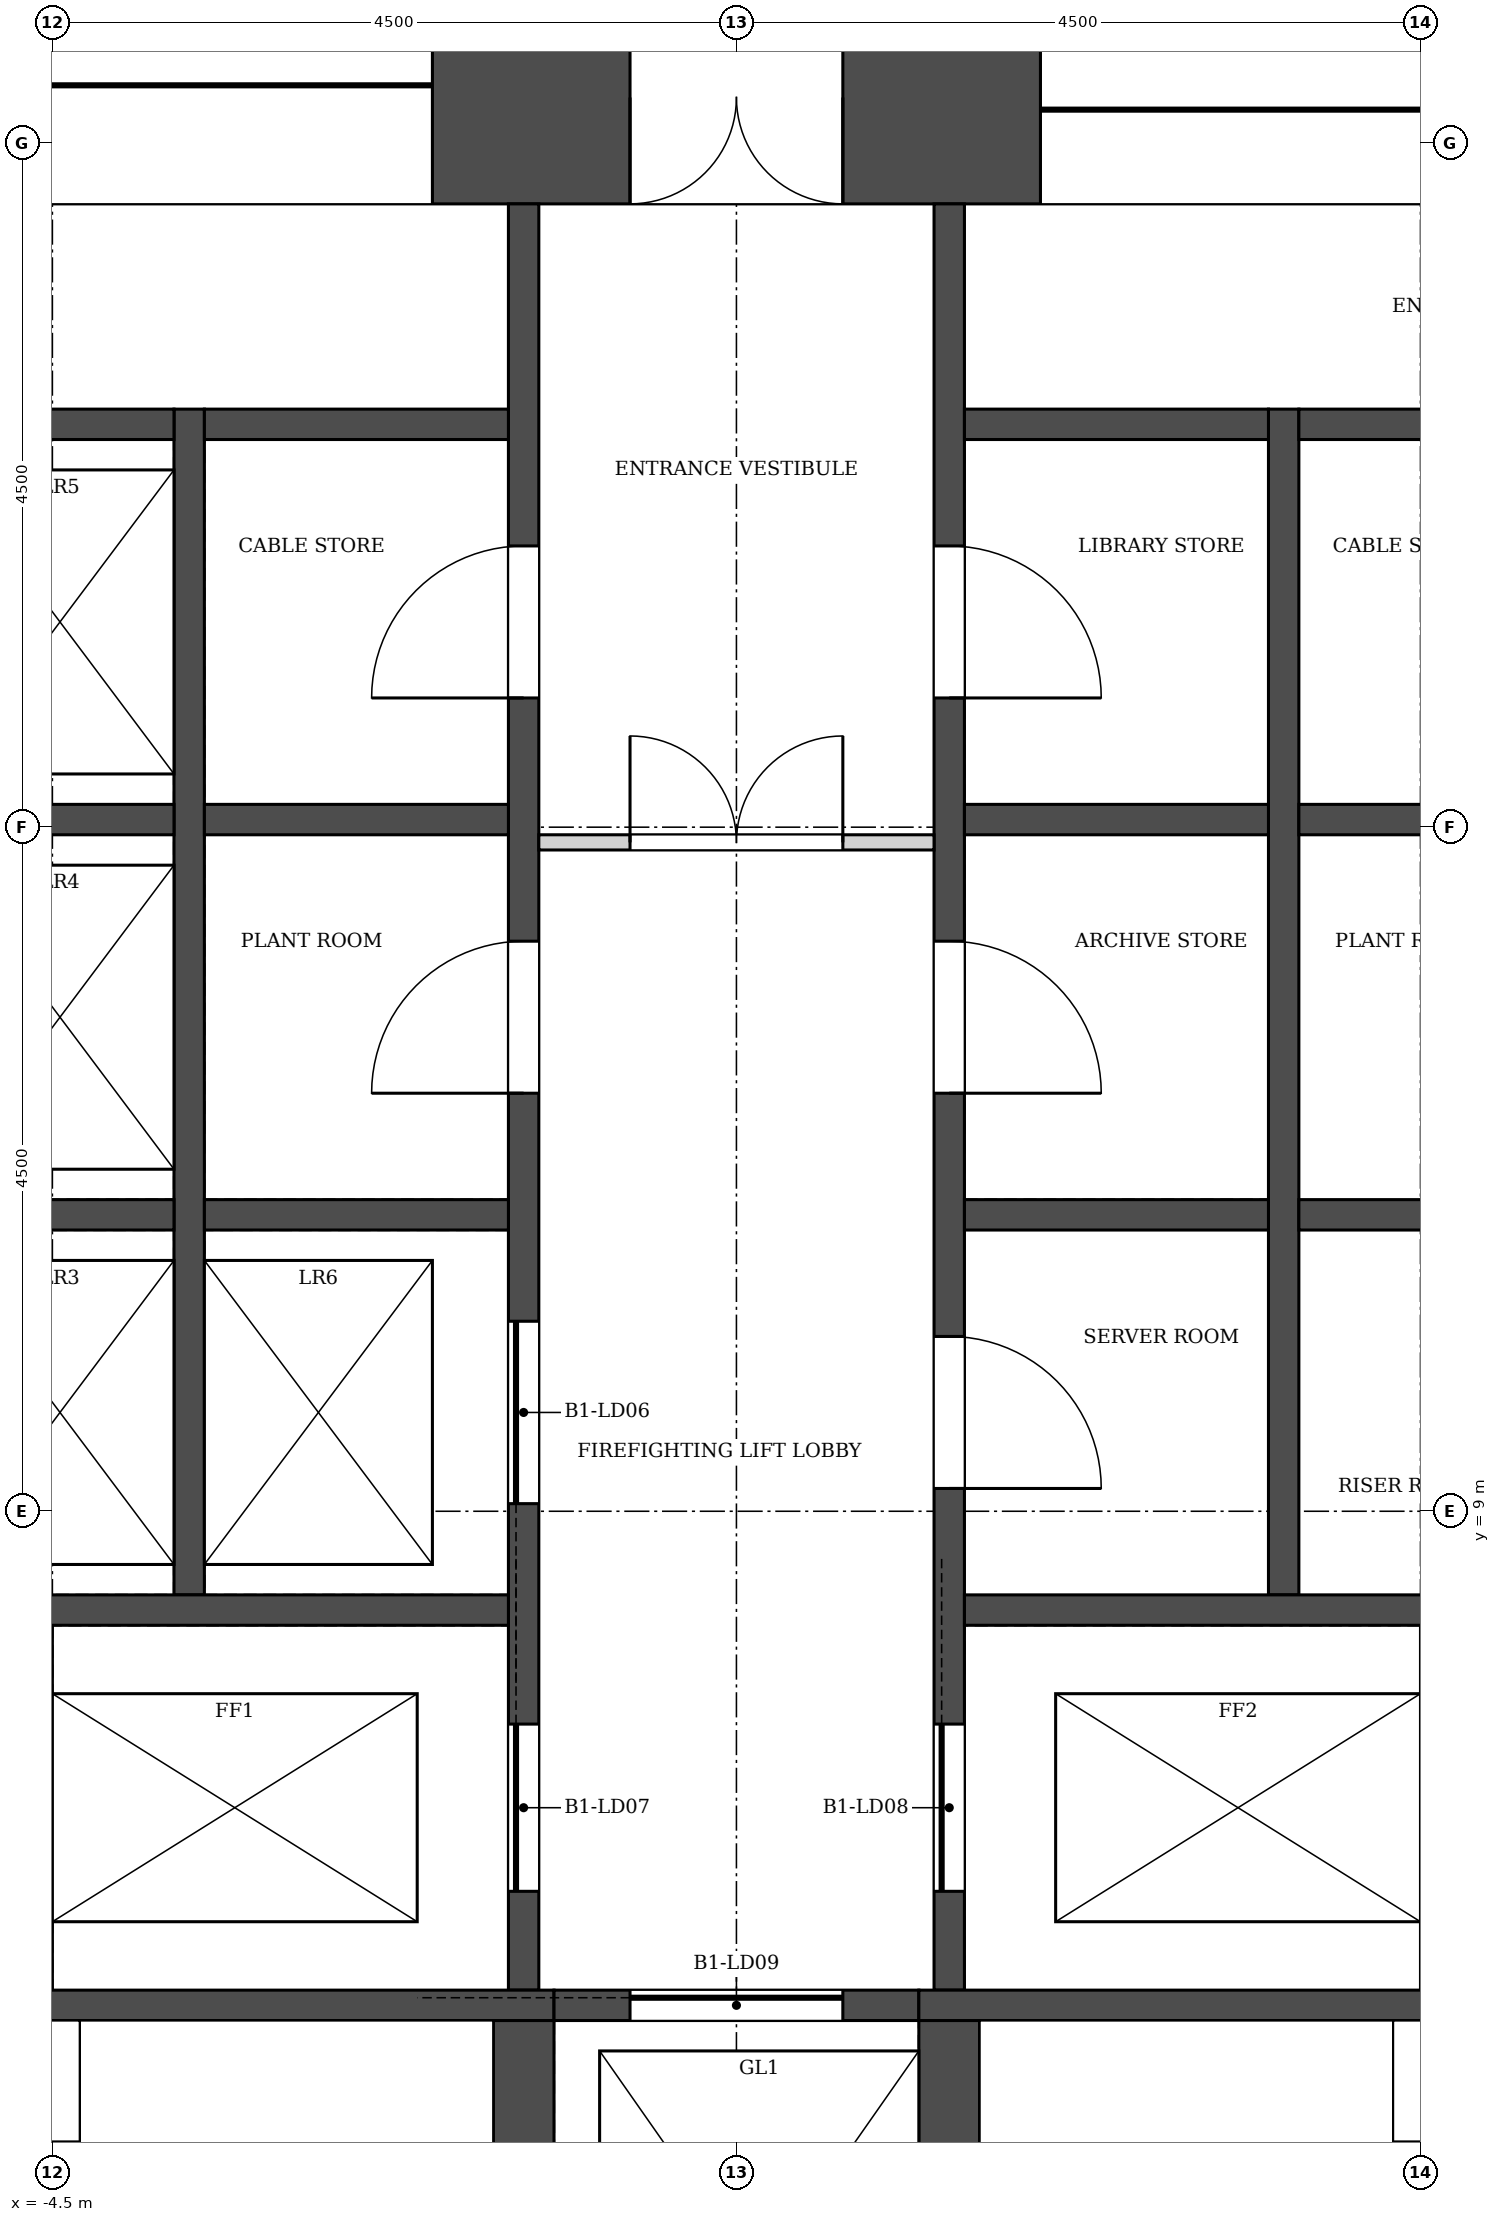
"""IFC4 building model, lengths in metres.
Left out: names, types, materials, properties, quantities, classifications, styles, units other than length and angle.
Written with IfcOpenShell. Run it as: python <this file> out.ifc"""

import sys

from ifc_helpers import new_model, si_unit, direction, frame, frame_2d, origin, place, context, subcontext, project, spatial, rectangle, extrude, element, fill, save


model = new_model("IFC4")
c1 = context("Model", 3, precision=1e-05, world=origin(), true_north=direction((0.0, 1.0)))
c2 = subcontext(c1, "Body", "Model", "MODEL_VIEW")
j1 = project(units=[si_unit("LENGTHUNIT", "METRE"), si_unit("PLANEANGLEUNIT", "RADIAN")], contexts=[c1])
p1 = place(None, origin())
s1 = spatial("IfcSite", under=j1, at=p1, CompositionType="ELEMENT")
p2 = place(p1, origin())
s2 = spatial("IfcBuilding", under=s1, at=p2, CompositionType="ELEMENT")
p3 = place(p2, frame((0.0, 0.0, -8.0)))
s3 = spatial("IfcBuildingStorey", under=s2, at=p3, CompositionType="ELEMENT", Elevation=-8.0)
p4 = place(p3, frame((9.412, 18.3, 0.0), z_axis=(0.0, 0.0, 1.0), x_axis=(-1.0, 0.0, 0.0)))
e1 = element("IfcWall", 1, at=p4, inside=s3, PredefinedType="SHEAR", context=c2, shape_type="SweptSolid", body=[
    extrude(rectangle(XDim=18.823, YDim=1.4, at=frame_2d((9.412, 0.0))), origin(), (0.0, 0.0, 1.0), 8.0),
])
p5 = place(p4, frame((8.711, 0.0, 0.0)))
e2 = element("IfcOpeningElement", 2, at=p5, cuts=e1, PredefinedType="OPENING", context=c2, shape_type="SweptSolid", body=[
    extrude(rectangle(XDim=1.4, YDim=2.1, at=frame_2d((0.7, 1.05))), frame((0.0, 0.71, 0.0), z_axis=(0.0, -1.0, 0.0), x_axis=(1.0, 0.0, 0.0)), (0.0, 0.0, 1.0), 1.42),
])
p6 = place(p4, frame((11.412, 0.0, 0.0)))
e3 = element("IfcOpeningElement", 3, at=p6, cuts=e1, PredefinedType="OPENING", context=c2, shape_type="SweptSolid", body=[
    extrude(rectangle(XDim=6.0, YDim=2.4, at=frame_2d((3.0, 1.2))), frame((0.0, 0.71, 0.0), z_axis=(0.0, -1.0, 0.0), x_axis=(1.0, 0.0, 0.0)), (0.0, 0.0, 1.0), 1.42),
])
p7 = place(p4, frame((1.412, 0.0, 0.0)))
e4 = element("IfcOpeningElement", 4, at=p7, cuts=e1, PredefinedType="OPENING", context=c2, shape_type="SweptSolid", body=[
    extrude(rectangle(XDim=6.0, YDim=2.4, at=frame_2d((3.0, 1.2))), frame((0.0, 0.71, 0.0), z_axis=(0.0, -1.0, 0.0), x_axis=(1.0, 0.0, 0.0)), (0.0, 0.0, 1.0), 1.42),
])
for number, where, z_axis, x_axis in (
    (5, (-3.6, 8.45, -0.35), (0.0, 0.0, 1.0), (0.0, 1.0, 0.0)),
    (6, (3.6, 8.45, -0.35), (0.0, 0.0, 1.0), (0.0, 1.0, 0.0)),
):
    element("IfcWall", number, at=place(p3, frame(where, z_axis=z_axis, x_axis=x_axis)), inside=s3, PredefinedType="SOLIDWALL", context=c2, shape_type="SweptSolid", body=[
        extrude(rectangle(XDim=7.8, YDim=0.2, at=frame_2d((3.9, 0.0))), origin(), (0.0, 0.0, 1.0), 7.95),
    ])
p8 = place(p3, frame((-1.4, 5.85, -0.35), z_axis=(0.0, 0.0, 1.0), x_axis=(0.0, 1.0, 0.0)))
e7 = element("IfcWall", 7, at=p8, inside=s3, PredefinedType="SOLIDWALL", context=c2, shape_type="SweptSolid", body=[
    extrude(rectangle(XDim=11.75, YDim=0.2, at=frame_2d((5.875, 0.0))), origin(), (0.0, 0.0, 1.0), 7.95),
])
p9 = place(p8, frame((3.2, 0.0, 0.35)))
e8 = element("IfcOpeningElement", 8, at=p9, cuts=e7, PredefinedType="OPENING", context=c2, shape_type="SweptSolid", body=[
    extrude(rectangle(XDim=1.2, YDim=2.1, at=frame_2d((0.6, 1.05))), frame((0.0, 0.11, 0.0), z_axis=(0.0, -1.0, 0.0), x_axis=(1.0, 0.0, 0.0)), (0.0, 0.0, 1.0), 0.22),
])
p10 = place(p8, frame((0.65, 0.0, 0.35)))
e9 = element("IfcOpeningElement", 9, at=p10, cuts=e7, PredefinedType="OPENING", context=c2, shape_type="SweptSolid", body=[
    extrude(rectangle(XDim=1.1, YDim=2.1, at=frame_2d((0.55, 1.05))), frame((0.0, 0.11, 0.0), z_axis=(0.0, -1.0, 0.0), x_axis=(1.0, 0.0, 0.0)), (0.0, 0.0, 1.0), 0.22),
])
p11 = place(p8, frame((5.9, 0.0, 0.35)))
e10 = element("IfcOpeningElement", 10, at=p11, cuts=e7, PredefinedType="OPENING", context=c2, shape_type="SweptSolid", body=[
    extrude(rectangle(XDim=1.0, YDim=2.1, at=frame_2d((0.5, 1.05))), frame((0.0, 0.11, 0.0), z_axis=(0.0, -1.0, 0.0), x_axis=(1.0, 0.0, 0.0)), (0.0, 0.0, 1.0), 0.22),
])
p12 = place(p8, frame((8.5, 0.0, 0.35)))
e11 = element("IfcOpeningElement", 11, at=p12, cuts=e7, PredefinedType="OPENING", context=c2, shape_type="SweptSolid", body=[
    extrude(rectangle(XDim=1.0, YDim=2.1, at=frame_2d((0.5, 1.05))), frame((0.0, 0.11, 0.0), z_axis=(0.0, -1.0, 0.0), x_axis=(1.0, 0.0, 0.0)), (0.0, 0.0, 1.0), 0.22),
])
p13 = place(p3, frame((1.4, 5.85, -0.35), z_axis=(0.0, 0.0, 1.0), x_axis=(0.0, 1.0, 0.0)))
e12 = element("IfcWall", 12, at=p13, inside=s3, PredefinedType="SOLIDWALL", context=c2, shape_type="SweptSolid", body=[
    extrude(rectangle(XDim=11.75, YDim=0.2, at=frame_2d((5.875, 0.0))), origin(), (0.0, 0.0, 1.0), 7.95),
])
p14 = place(p13, frame((0.65, 0.0, 0.35)))
e13 = element("IfcOpeningElement", 13, at=p14, cuts=e12, PredefinedType="OPENING", context=c2, shape_type="SweptSolid", body=[
    extrude(rectangle(XDim=1.1, YDim=2.1, at=frame_2d((0.55, 1.05))), frame((0.0, 0.11, 0.0), z_axis=(0.0, -1.0, 0.0), x_axis=(1.0, 0.0, 0.0)), (0.0, 0.0, 1.0), 0.22),
])
p15 = place(p13, frame((3.3, 0.0, 0.35)))
e14 = element("IfcOpeningElement", 14, at=p15, cuts=e12, PredefinedType="OPENING", context=c2, shape_type="SweptSolid", body=[
    extrude(rectangle(XDim=1.0, YDim=2.1, at=frame_2d((0.5, 1.05))), frame((0.0, 0.11, 0.0), z_axis=(0.0, -1.0, 0.0), x_axis=(1.0, 0.0, 0.0)), (0.0, 0.0, 1.0), 0.22),
])
p16 = place(p13, frame((5.9, 0.0, 0.35)))
e15 = element("IfcOpeningElement", 15, at=p16, cuts=e12, PredefinedType="OPENING", context=c2, shape_type="SweptSolid", body=[
    extrude(rectangle(XDim=1.0, YDim=2.1, at=frame_2d((0.5, 1.05))), frame((0.0, 0.11, 0.0), z_axis=(0.0, -1.0, 0.0), x_axis=(1.0, 0.0, 0.0)), (0.0, 0.0, 1.0), 0.22),
])
p17 = place(p13, frame((8.5, 0.0, 0.35)))
e16 = element("IfcOpeningElement", 16, at=p17, cuts=e12, PredefinedType="OPENING", context=c2, shape_type="SweptSolid", body=[
    extrude(rectangle(XDim=1.0, YDim=2.1, at=frame_2d((0.5, 1.05))), frame((0.0, 0.11, 0.0), z_axis=(0.0, -1.0, 0.0), x_axis=(1.0, 0.0, 0.0)), (0.0, 0.0, 1.0), 0.22),
])
for number, where, z_axis, x_axis in (
    (17, (-5.7, 8.35, -0.35), (0.0, 0.0, 1.0), (1.0, 0.0, 0.0)),
    (18, (1.5, 8.35, -0.35), (0.0, 0.0, 1.0), (1.0, 0.0, 0.0)),
):
    element("IfcWall", number, at=place(p3, frame(where, z_axis=z_axis, x_axis=x_axis)), inside=s3, PredefinedType="SOLIDWALL", context=c2, shape_type="SweptSolid", body=[
        extrude(rectangle(XDim=4.2, YDim=0.2, at=frame_2d((2.1, 0.0))), origin(), (0.0, 0.0, 1.0), 7.95),
    ])
p18 = place(p3, frame((-12.6, 5.75, -0.35), z_axis=(0.0, 0.0, 1.0), x_axis=(1.0, 0.0, 0.0)))
e19 = element("IfcWall", 19, at=p18, inside=s3, PredefinedType="SOLIDWALL", context=c2, shape_type="SweptSolid", body=[
    extrude(rectangle(XDim=11.4, YDim=0.2, at=frame_2d((5.7, 0.0))), origin(), (0.0, 0.0, 1.0), 7.95),
])
p19 = place(p3, frame((-1.2, 5.75, -0.35), z_axis=(0.0, 0.0, 1.0), x_axis=(1.0, 0.0, 0.0)))
e20 = element("IfcWall", 20, at=p19, inside=s3, PredefinedType="SOLIDWALL", context=c2, shape_type="SweptSolid", body=[
    extrude(rectangle(XDim=2.4, YDim=0.2, at=frame_2d((1.2, 0.0))), origin(), (0.0, 0.0, 1.0), 7.95),
])
p20 = place(p19, frame((0.5, 0.0, 0.35)))
e21 = element("IfcOpeningElement", 21, at=p20, cuts=e20, PredefinedType="OPENING", context=c2, shape_type="SweptSolid", body=[
    extrude(rectangle(XDim=1.4, YDim=2.1, at=frame_2d((0.7, 1.05))), frame((0.0, 0.11, 0.0), z_axis=(0.0, -1.0, 0.0), x_axis=(1.0, 0.0, 0.0)), (0.0, 0.0, 1.0), 0.22),
])
p21 = place(p3, frame((1.2, 5.75, -0.35), z_axis=(0.0, 0.0, 1.0), x_axis=(1.0, 0.0, 0.0)))
e22 = element("IfcWall", 22, at=p21, inside=s3, PredefinedType="SOLIDWALL", context=c2, shape_type="SweptSolid", body=[
    extrude(rectangle(XDim=11.4, YDim=0.2, at=frame_2d((5.7, 0.0))), origin(), (0.0, 0.0, 1.0), 7.95),
])
for number, where, z_axis, x_axis in (
    (23, (-1.4, 2.25, -0.35), (0.0, 0.0, 1.0), (0.0, 1.0, 0.0)),
    (24, (1.4, 2.25, -0.35), (0.0, 0.0, 1.0), (0.0, 1.0, 0.0)),
):
    element("IfcWall", number, at=place(p3, frame(where, z_axis=z_axis, x_axis=x_axis)), inside=s3, PredefinedType="SOLIDWALL", context=c2, shape_type="SweptSolid", body=[
        extrude(rectangle(XDim=3.4, YDim=0.4, at=frame_2d((1.7, 0.0))), origin(), (0.0, 0.0, 1.0), 7.95),
    ])
for number, where, z_axis, x_axis in (
    (25, (-5.7, 10.95, -0.35), (0.0, 0.0, 1.0), (1.0, 0.0, 0.0)),
    (26, (-5.7, 13.55, -0.35), (0.0, 0.0, 1.0), (1.0, 0.0, 0.0)),
    (27, (-5.7, 16.15, -0.35), (0.0, 0.0, 1.0), (1.0, 0.0, 0.0)),
    (28, (-3.5, 10.95, -0.35), (0.0, 0.0, 1.0), (1.0, 0.0, 0.0)),
    (29, (-3.5, 13.55, -0.35), (0.0, 0.0, 1.0), (1.0, 0.0, 0.0)),
    (30, (-3.5, 16.15, -0.35), (0.0, 0.0, 1.0), (1.0, 0.0, 0.0)),
    (31, (3.7, 10.95, -0.35), (0.0, 0.0, 1.0), (1.0, 0.0, 0.0)),
    (32, (3.7, 13.55, -0.35), (0.0, 0.0, 1.0), (1.0, 0.0, 0.0)),
    (33, (3.7, 16.15, -0.35), (0.0, 0.0, 1.0), (1.0, 0.0, 0.0)),
    (34, (1.5, 10.95, -0.35), (0.0, 0.0, 1.0), (1.0, 0.0, 0.0)),
    (35, (1.5, 13.55, -0.35), (0.0, 0.0, 1.0), (1.0, 0.0, 0.0)),
    (36, (1.5, 16.15, -0.35), (0.0, 0.0, 1.0), (1.0, 0.0, 0.0)),
):
    element("IfcWall", number, at=place(p3, frame(where, z_axis=z_axis, x_axis=x_axis)), inside=s3, PredefinedType="SOLIDWALL", context=c2, shape_type="SweptSolid", body=[
        extrude(rectangle(XDim=2.0, YDim=0.2, at=frame_2d((1.0, 0.0))), origin(), (0.0, 0.0, 1.0), 7.95),
    ])
p22 = place(p3, frame((-1.3, 13.4, 0.0), z_axis=(0.0, 0.0, 1.0), x_axis=(1.0, 0.0, 0.0)))
e37 = element("IfcWall", 37, at=p22, inside=s3, PredefinedType="PARTITIONING", context=c2, shape_type="SweptSolid", body=[
    extrude(rectangle(XDim=2.6, YDim=0.1, at=frame_2d((1.3, 0.0))), origin(), (0.0, 0.0, 1.0), 7.6),
])
p23 = place(p22, frame((0.6, 0.0, 0.0)))
e38 = element("IfcOpeningElement", 38, at=p23, cuts=e37, PredefinedType="OPENING", context=c2, shape_type="SweptSolid", body=[
    extrude(rectangle(XDim=1.4, YDim=2.1, at=frame_2d((0.7, 1.05))), frame((0.0, 0.06, 0.0), z_axis=(0.0, -1.0, 0.0), x_axis=(1.0, 0.0, 0.0)), (0.0, 0.0, 1.0), 0.12),
])
p24 = place(p9, origin())
e39 = element("IfcDoor", 39, at=p24, inside=s3, OperationType="SLIDING_TO_LEFT", PredefinedType="DOOR", context=c2, shape_type="SweptSolid", body=[
    extrude(rectangle(XDim=1.2, YDim=2.1, at=frame_2d((0.6, 1.05))), frame((0.0, 0.025, 0.0), z_axis=(0.0, -1.0, 0.0), x_axis=(1.0, 0.0, 0.0)), (0.0, 0.0, 1.0), 0.05),
])
fill(e8, e39)
p25 = place(p10, origin())
e40 = element("IfcDoor", 40, at=p25, inside=s3, OperationType="SLIDING_TO_RIGHT", PredefinedType="DOOR", context=c2, shape_type="SweptSolid", body=[
    extrude(rectangle(XDim=1.1, YDim=2.1, at=frame_2d((0.55, 1.05))), frame((0.0, 0.025, 0.0), z_axis=(0.0, -1.0, 0.0), x_axis=(1.0, 0.0, 0.0)), (0.0, 0.0, 1.0), 0.05),
])
fill(e9, e40)
p26 = place(p14, origin())
e41 = element("IfcDoor", 41, at=p26, inside=s3, OperationType="SLIDING_TO_RIGHT", PredefinedType="DOOR", context=c2, shape_type="SweptSolid", body=[
    extrude(rectangle(XDim=1.1, YDim=2.1, at=frame_2d((0.55, 1.05))), frame((0.0, 0.025, 0.0), z_axis=(0.0, -1.0, 0.0), x_axis=(1.0, 0.0, 0.0)), (0.0, 0.0, 1.0), 0.05),
])
fill(e13, e41)
p27 = place(p20, origin())
e42 = element("IfcDoor", 42, at=p27, inside=s3, OperationType="SLIDING_TO_LEFT", PredefinedType="DOOR", context=c2, shape_type="SweptSolid", body=[
    extrude(rectangle(XDim=1.4, YDim=2.1, at=frame_2d((0.7, 1.05))), frame((0.0, 0.025, 0.0), z_axis=(0.0, -1.0, 0.0), x_axis=(1.0, 0.0, 0.0)), (0.0, 0.0, 1.0), 0.05),
])
fill(e21, e42)
p28 = place(p11, origin())
e43 = element("IfcDoor", 43, at=p28, inside=s3, OperationType="SINGLE_SWING_LEFT", PredefinedType="DOOR", context=c2, shape_type="SweptSolid", body=[
    extrude(rectangle(XDim=1.0, YDim=2.1, at=frame_2d((0.5, 1.05))), frame((0.0, 0.025, 0.0), z_axis=(0.0, -1.0, 0.0), x_axis=(1.0, 0.0, 0.0)), (0.0, 0.0, 1.0), 0.05),
])
fill(e10, e43)
p29 = place(p12, origin())
e44 = element("IfcDoor", 44, at=p29, inside=s3, OperationType="SINGLE_SWING_LEFT", PredefinedType="DOOR", context=c2, shape_type="SweptSolid", body=[
    extrude(rectangle(XDim=1.0, YDim=2.1, at=frame_2d((0.5, 1.05))), frame((0.0, 0.025, 0.0), z_axis=(0.0, -1.0, 0.0), x_axis=(1.0, 0.0, 0.0)), (0.0, 0.0, 1.0), 0.05),
])
fill(e11, e44)
p30 = place(p15, frame((1.0, 0.0, 0.0), z_axis=(0.0, 0.0, 1.0), x_axis=(-1.0, 0.0, 0.0)))
e45 = element("IfcDoor", 45, at=p30, inside=s3, OperationType="SINGLE_SWING_RIGHT", PredefinedType="DOOR", context=c2, shape_type="SweptSolid", body=[
    extrude(rectangle(XDim=1.0, YDim=2.1, at=frame_2d((0.5, 1.05))), frame((0.0, 0.025, 0.0), z_axis=(0.0, -1.0, 0.0), x_axis=(1.0, 0.0, 0.0)), (0.0, 0.0, 1.0), 0.05),
])
fill(e14, e45)
p31 = place(p16, frame((1.0, 0.0, 0.0), z_axis=(0.0, 0.0, 1.0), x_axis=(-1.0, 0.0, 0.0)))
e46 = element("IfcDoor", 46, at=p31, inside=s3, OperationType="SINGLE_SWING_RIGHT", PredefinedType="DOOR", context=c2, shape_type="SweptSolid", body=[
    extrude(rectangle(XDim=1.0, YDim=2.1, at=frame_2d((0.5, 1.05))), frame((0.0, 0.025, 0.0), z_axis=(0.0, -1.0, 0.0), x_axis=(1.0, 0.0, 0.0)), (0.0, 0.0, 1.0), 0.05),
])
fill(e15, e46)
p32 = place(p17, frame((1.0, 0.0, 0.0), z_axis=(0.0, 0.0, 1.0), x_axis=(-1.0, 0.0, 0.0)))
e47 = element("IfcDoor", 47, at=p32, inside=s3, OperationType="SINGLE_SWING_RIGHT", PredefinedType="DOOR", context=c2, shape_type="SweptSolid", body=[
    extrude(rectangle(XDim=1.0, YDim=2.1, at=frame_2d((0.5, 1.05))), frame((0.0, 0.025, 0.0), z_axis=(0.0, -1.0, 0.0), x_axis=(1.0, 0.0, 0.0)), (0.0, 0.0, 1.0), 0.05),
])
fill(e16, e47)
p33 = place(p23, origin())
e48 = element("IfcDoor", 48, at=p33, inside=s3, OperationType="DOUBLE_DOOR_SINGLE_SWING", PredefinedType="DOOR", context=c2, shape_type="SweptSolid", body=[
    extrude(rectangle(XDim=1.4, YDim=2.1, at=frame_2d((0.7, 1.05))), frame((0.0, 0.025, 0.0), z_axis=(0.0, -1.0, 0.0), x_axis=(1.0, 0.0, 0.0)), (0.0, 0.0, 1.0), 0.05),
])
fill(e38, e48)
p34 = place(p5, origin())
e49 = element("IfcDoor", 49, at=p34, inside=s3, OperationType="DOUBLE_DOOR_SINGLE_SWING", PredefinedType="DOOR", context=c2, shape_type="SweptSolid", body=[
    extrude(rectangle(XDim=1.4, YDim=2.1, at=frame_2d((0.7, 1.05))), frame((0.0, 0.025, 0.0), z_axis=(0.0, -1.0, 0.0), x_axis=(1.0, 0.0, 0.0)), (0.0, 0.0, 1.0), 0.05),
])
fill(e2, e49)
p35 = place(p6, origin())
e50 = element("IfcDoor", 50, at=p35, inside=s3, OperationType="DOUBLE_DOOR_SLIDING", PredefinedType="DOOR", context=c2, shape_type="SweptSolid", body=[
    extrude(rectangle(XDim=6.0, YDim=2.4, at=frame_2d((3.0, 1.2))), frame((0.0, 0.025, 0.0), z_axis=(0.0, -1.0, 0.0), x_axis=(1.0, 0.0, 0.0)), (0.0, 0.0, 1.0), 0.05),
])
fill(e3, e50)
p36 = place(p7, origin())
e51 = element("IfcDoor", 51, at=p36, inside=s3, OperationType="DOUBLE_DOOR_SLIDING", PredefinedType="DOOR", context=c2, shape_type="SweptSolid", body=[
    extrude(rectangle(XDim=6.0, YDim=2.4, at=frame_2d((3.0, 1.2))), frame((0.0, 0.025, 0.0), z_axis=(0.0, -1.0, 0.0), x_axis=(1.0, 0.0, 0.0)), (0.0, 0.0, 1.0), 0.05),
])
fill(e4, e51)
save(model, sys.argv[1])
